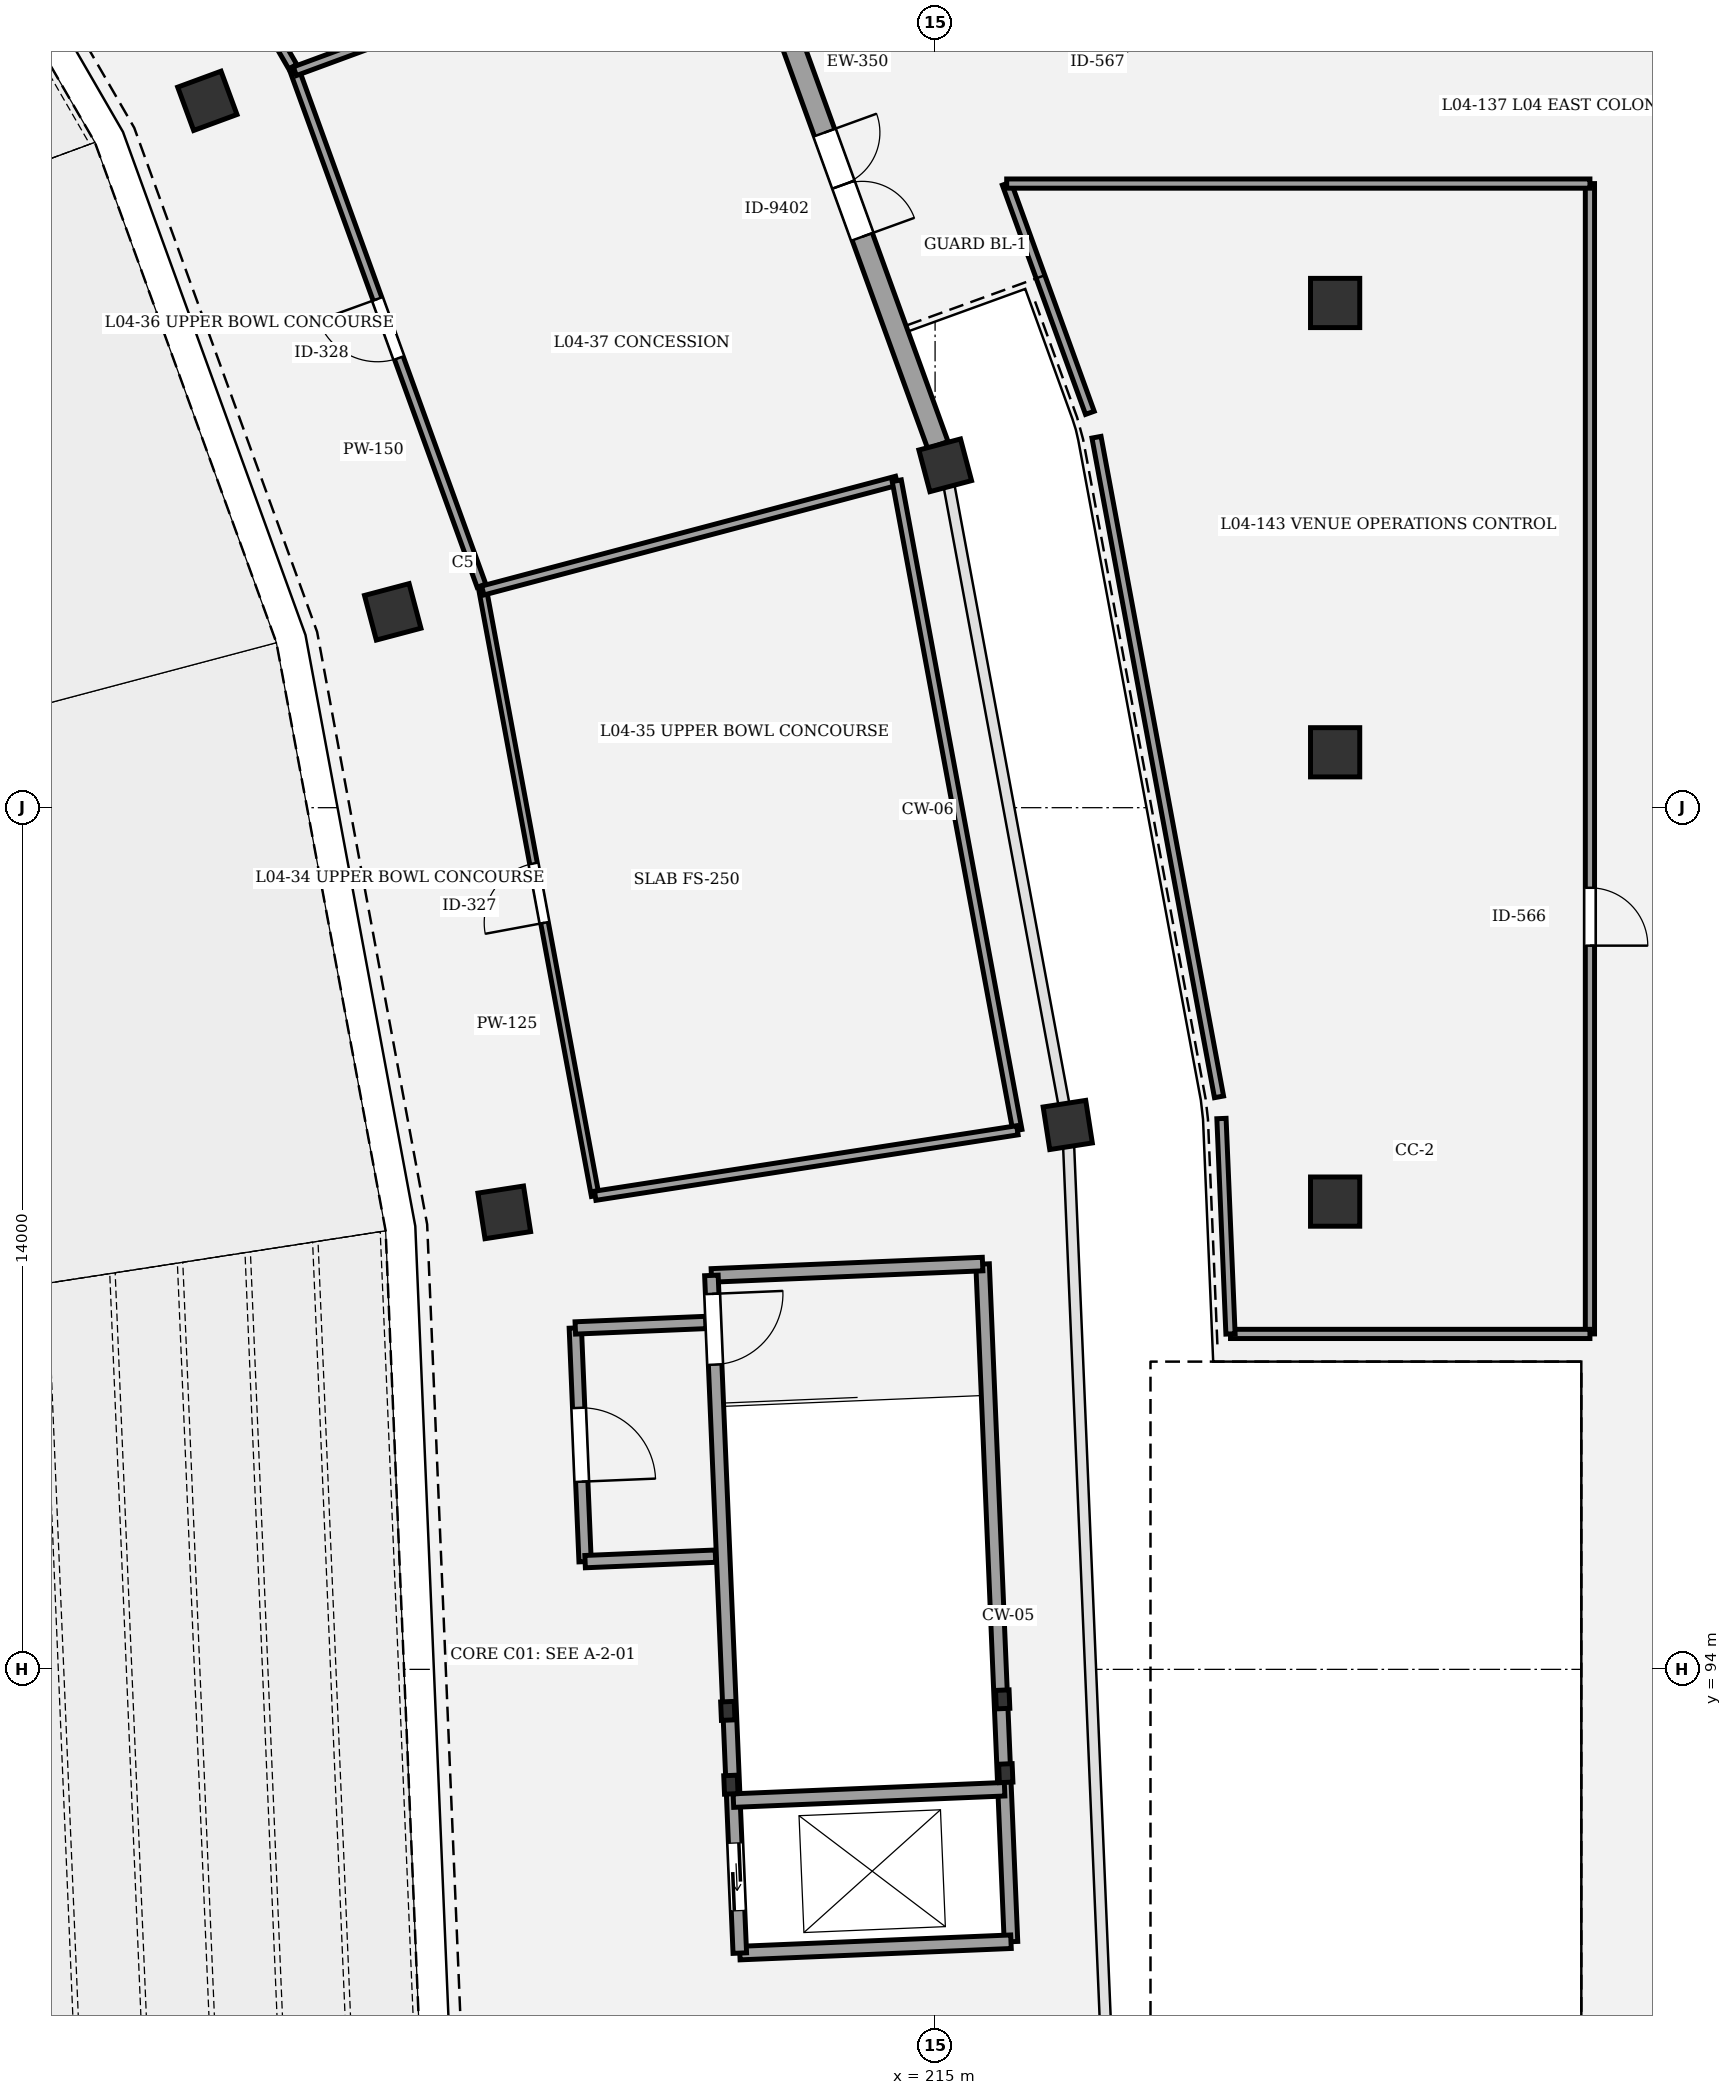
"""IFC4 building model, lengths in metres.
Left out: names, types, materials, properties, quantities, classifications, styles, units other than length and angle.
Written with IfcOpenShell. Run it as: python <this file> out.ifc"""

import sys

from ifc_helpers import new_model, si_unit, direction, frame, frame_2d, origin, origin_2d, place, context, subcontext, project, spatial, rectangle, circle, extrude, element, fill, save


model = new_model("IFC4")
c1 = context("Model", 3, precision=1e-05, world=origin(), true_north=direction((0.0, 1.0)))
c2 = subcontext(c1, "Body", "Model", "MODEL_VIEW")
j1 = project(units=[si_unit("LENGTHUNIT", "METRE"), si_unit("PLANEANGLEUNIT", "RADIAN")], contexts=[c1])
p1 = place(None, origin())
s1 = spatial("IfcSite", under=j1, at=p1, CompositionType="ELEMENT")
p2 = place(p1, origin())
s2 = spatial("IfcBuilding", under=s1, at=p2, CompositionType="ELEMENT")
p3 = place(p2, frame((0.0, 0.0, 19.2)))
s3 = spatial("IfcBuildingStorey", under=s2, at=p3, CompositionType="ELEMENT", Elevation=19.2)
p4 = place(p3, frame((208.0, 101.425, 0.0), z_axis=(0.0, 0.0, 1.0), x_axis=(0.98817491911, 0.153330783737, 0.0)))
e1 = element("IfcColumn", 1, at=p4, inside=s3, PredefinedType="COLUMN", context=c2, shape_type="SweptSolid", body=[
    extrude(rectangle(XDim=0.75, YDim=0.75, at=origin_2d()), origin(), (0.0, 0.0, 1.0), 4.8),
])
p5 = place(p3, frame((217.156, 102.845, 0.0), z_axis=(0.0, 0.0, 1.0), x_axis=(0.98817491911, 0.153330783737, 0.0)))
e2 = element("IfcColumn", 2, at=p5, inside=s3, PredefinedType="COLUMN", context=c2, shape_type="SweptSolid", body=[
    extrude(rectangle(XDim=0.7, YDim=0.7, at=origin_2d()), origin(), (0.0, 0.0, 1.0), 4.8),
])
p6 = place(p3, frame((206.188, 111.182, 0.0), z_axis=(0.0, 0.0, 1.0), x_axis=(0.966600102017, 0.256289373133, 0.0)))
e3 = element("IfcColumn", 3, at=p6, inside=s3, PredefinedType="COLUMN", context=c2, shape_type="SweptSolid", body=[
    extrude(rectangle(XDim=0.75, YDim=0.75, at=origin_2d()), origin(), (0.0, 0.0, 1.0), 4.8),
])
p7 = place(p3, frame((215.165, 113.562, 0.0), z_axis=(0.0, 0.0, 1.0), x_axis=(0.966600102017, 0.256289373133, 0.0)))
e4 = element("IfcColumn", 4, at=p7, inside=s3, PredefinedType="COLUMN", context=c2, shape_type="SweptSolid", body=[
    extrude(rectangle(XDim=0.7, YDim=0.7, at=origin_2d()), origin(), (0.0, 0.0, 1.0), 4.8),
])
p8 = place(p3, frame((203.176, 119.484, 0.0), z_axis=(0.0, 0.0, 1.0), x_axis=(0.938372433776, 0.34562577382, 0.0)))
e5 = element("IfcColumn", 5, at=p8, inside=s3, PredefinedType="COLUMN", context=c2, shape_type="SweptSolid", body=[
    extrude(rectangle(XDim=0.75, YDim=0.75, at=origin_2d()), origin(), (0.0, 0.0, 1.0), 4.8),
])
for number, where, z_axis, x_axis in (
    (6, (221.5, 101.6, 0.0), (0.0, 0.0, 1.0), (1.0, 0.0, 0.0)),
    (7, (221.5, 108.9, 0.0), (0.0, 0.0, 1.0), (1.0, 0.0, 0.0)),
    (8, (221.5, 116.2, 0.0), (0.0, 0.0, 1.0), (1.0, 0.0, 0.0)),
):
    element("IfcColumn", number, at=place(p3, frame(where, z_axis=z_axis, x_axis=x_axis)), inside=s3, PredefinedType="COLUMN", context=c2, shape_type="SweptSolid", body=[
        extrude(circle(Radius=0.4, at=origin_2d()), origin(), (0.0, 0.0, 1.0), 4.8),
    ])
p9 = place(p3, frame((211.975, 122.355, 0.0), z_axis=(0.0, 0.0, 1.0), x_axis=(0.341022457694, -0.9400551491, 0.0)))
e9 = element("IfcWall", 9, at=p9, inside=s3, PredefinedType="STANDARD", context=c2, shape_type="SweptSolid", body=[
    extrude(rectangle(XDim=9.005, YDim=0.35, at=frame_2d((4.503, 0.0))), origin(), (0.0, 0.0, 1.0), 3.57),
])
p10 = place(p9, frame((3.603, 0.0, 0.0)))
e10 = element("IfcOpeningElement", 10, at=p10, cuts=e9, PredefinedType="OPENING", context=c2, shape_type="SweptSolid", body=[
    extrude(rectangle(XDim=1.8, YDim=2.4, at=frame_2d((0.9, 1.2))), frame((0.0, 0.185, 0.0), z_axis=(0.0, -1.0, 0.0), x_axis=(1.0, 0.0, 0.0)), (0.0, 0.0, 1.0), 0.37),
])
for number, where, z_axis, x_axis in (
    (11, (211.632, 93.325, 0.0), (0.0, 0.0, 1.0), (0.042, -0.999, 0.0)),
    (12, (211.682, 92.126, 0.0), (0.0, 0.0, 1.0), (0.042, -0.999, 0.0)),
    (13, (216.148, 92.314, 0.0), (0.0, 0.0, 1.0), (0.042, -0.999, 0.0)),
    (14, (216.098, 93.513, 0.0), (0.0, 0.0, 1.0), (0.042, -0.999, 0.0)),
):
    element("IfcColumn", number, at=place(p3, frame(where, z_axis=z_axis, x_axis=x_axis)), inside=s3, PredefinedType="COLUMN", context=c2, shape_type="SweptSolid", body=[
        extrude(rectangle(XDim=0.3, YDim=0.22, at=origin_2d()), origin(), (0.0, 0.0, 1.0), 4.8),
    ])
p11 = place(p3, frame((215.772, 100.585, 0.0), z_axis=(0.0, 0.0, 1.0), x_axis=(0.041871977473, -0.999122984173, 0.0)))
e15 = element("IfcWall", 15, at=p11, inside=s3, PredefinedType="SHEAR", context=c2, shape_type="SweptSolid", body=[
    extrude(rectangle(XDim=11.02, YDim=0.22, at=frame_2d((5.51, 0.0))), origin(), (0.0, 0.0, 1.0), 4.55),
])
for number, where, z_axis, x_axis in (
    (16, (211.365, 100.4, 0.0), (0.0, 0.0, 1.0), (0.999, 0.042, 0.0)),
    (17, (211.827, 89.39, 0.0), (0.0, 0.0, 1.0), (0.999, 0.042, 0.0)),
):
    element("IfcWall", number, at=place(p3, frame(where, z_axis=z_axis, x_axis=x_axis)), inside=s3, PredefinedType="SHEAR", context=c2, shape_type="SweptSolid", body=[
        extrude(rectangle(XDim=4.41, YDim=0.22, at=frame_2d((2.205, 0.0))), origin(), (0.0, 0.0, 1.0), 4.55),
    ])
p12 = place(p3, frame((211.365, 100.4, 0.0), z_axis=(0.0, 0.0, 1.0), x_axis=(0.041871977473, -0.999122984173, 0.0)))
e18 = element("IfcWall", 18, at=p12, inside=s3, PredefinedType="SHEAR", context=c2, shape_type="SweptSolid", body=[
    extrude(rectangle(XDim=11.02, YDim=0.22, at=frame_2d((5.51, 0.0))), origin(), (0.0, 0.0, 1.0), 4.55),
])
p13 = place(p12, frame((0.3, 0.0, 0.0)))
e19 = element("IfcOpeningElement", 19, at=p13, cuts=e18, PredefinedType="OPENING", context=c2, shape_type="SweptSolid", body=[
    extrude(rectangle(XDim=1.15, YDim=2.15, at=frame_2d((0.575, 1.075))), frame((0.0, 0.12, 0.0), z_axis=(0.0, -1.0, 0.0), x_axis=(1.0, 0.0, 0.0)), (0.0, 0.0, 1.0), 0.24),
])
p14 = place(p12, frame((9.23, 0.0, 0.0)))
e20 = element("IfcOpeningElement", 20, at=p14, cuts=e18, PredefinedType="OPENING", context=c2, shape_type="SweptSolid", body=[
    extrude(rectangle(XDim=1.1, YDim=2.15, at=frame_2d((0.55, 1.075))), frame((0.0, 0.12, 0.0), z_axis=(0.0, -1.0, 0.0), x_axis=(1.0, 0.0, 0.0)), (0.0, 0.0, 1.0), 0.24),
])
p15 = place(p3, frame((211.723, 91.868, 0.0), z_axis=(0.0, 0.0, 1.0), x_axis=(0.999121521721, 0.041906859039, 0.0)))
e21 = element("IfcWall", 21, at=p15, inside=s3, PredefinedType="SHEAR", context=c2, shape_type="SweptSolid", body=[
    extrude(rectangle(XDim=4.41, YDim=0.22, at=frame_2d((2.205, 0.0))), origin(), (0.0, 0.0, 1.0), 4.55),
])
p16 = place(p3, frame((209.154, 99.547, 0.0), z_axis=(0.0, 0.0, 1.0), x_axis=(0.041889762691, -0.999122238658, 0.0)))
e22 = element("IfcWall", 22, at=p16, inside=s3, PredefinedType="PARTITIONING", context=c2, shape_type="SweptSolid", body=[
    extrude(rectangle(XDim=3.8, YDim=0.2, at=frame_2d((1.9, 0.0))), origin(), (0.0, 0.0, 1.0), 3.65),
])
p17 = place(p16, frame((1.3, 0.0, 0.0)))
e23 = element("IfcOpeningElement", 23, at=p17, cuts=e22, PredefinedType="OPENING", context=c2, shape_type="SweptSolid", body=[
    extrude(rectangle(XDim=1.2, YDim=2.18, at=frame_2d((0.6, 1.09))), frame((0.0, 0.11, 0.0), z_axis=(0.0, -1.0, 0.0), x_axis=(1.0, 0.0, 0.0)), (0.0, 0.0, 1.0), 0.22),
])
for number, where, z_axis, x_axis in (
    (24, (209.154, 99.547, 0.0), (0.0, 0.0, 1.0), (0.999, 0.042, 0.0)),
    (25, (209.313, 95.75, 0.0), (0.0, 0.0, 1.0), (0.999, 0.042, 0.0)),
):
    element("IfcWall", number, at=place(p3, frame(where, z_axis=z_axis, x_axis=x_axis)), inside=s3, PredefinedType="PARTITIONING", context=c2, shape_type="SweptSolid", body=[
        extrude(rectangle(XDim=2.12, YDim=0.2, at=frame_2d((1.06, 0.0))), origin(), (0.0, 0.0, 1.0), 3.65),
    ])
p18 = place(p3, frame((209.478, 101.695, 0.0), z_axis=(0.0, 0.0, 1.0), x_axis=(-0.18262590076, 0.983182475623, 0.0)))
e26 = element("IfcWall", 26, at=p18, inside=s3, PredefinedType="PARTITIONING", context=c2, shape_type="SweptSolid", body=[
    extrude(rectangle(XDim=10.002, YDim=0.125, at=frame_2d((5.001, 0.0))), origin(), (0.0, 0.0, 1.0), 3.55),
])
p19 = place(p18, frame((4.511, 0.0, 0.0)))
e27 = element("IfcOpeningElement", 27, at=p19, cuts=e26, PredefinedType="OPENING", context=c2, shape_type="SweptSolid", body=[
    extrude(rectangle(XDim=0.98, YDim=2.1, at=frame_2d((0.49, 1.05))), frame((0.0, 0.073, 0.0), z_axis=(0.0, -1.0, 0.0), x_axis=(1.0, 0.0, 0.0)), (0.0, 0.0, 1.0), 0.145),
])
p20 = place(p3, frame((207.63, 111.606, 0.0), z_axis=(0.0, 0.0, 1.0), x_axis=(-0.341024369151, 0.940054455681, 0.0)))
e28 = element("IfcWall", 28, at=p20, inside=s3, PredefinedType="PARTITIONING", context=c2, shape_type="SweptSolid", body=[
    extrude(rectangle(XDim=8.893, YDim=0.15, at=frame_2d((4.447, 0.0))), origin(), (0.0, 0.0, 1.0), 3.55),
])
p21 = place(p20, frame((3.936, 0.0, 0.0)))
e29 = element("IfcOpeningElement", 29, at=p21, cuts=e28, PredefinedType="OPENING", context=c2, shape_type="SweptSolid", body=[
    extrude(rectangle(XDim=1.02, YDim=2.1, at=frame_2d((0.51, 1.05))), frame((0.0, 0.085, 0.0), z_axis=(0.0, -1.0, 0.0), x_axis=(1.0, 0.0, 0.0)), (0.0, 0.0, 1.0), 0.17),
])
p22 = place(p3, frame((204.564, 120.039, 0.0), z_axis=(0.0, 0.0, 1.0), x_axis=(-0.500563217362, 0.865699985806, 0.0)))
e30 = element("IfcWall", 30, at=p22, inside=s3, PredefinedType="PARTITIONING", context=c2, shape_type="SweptSolid", body=[
    extrude(rectangle(XDim=8.444, YDim=0.15, at=frame_2d((4.222, 0.0))), origin(), (0.0, 0.0, 1.0), 3.55),
])
p23 = place(p22, frame((3.692, 0.0, 0.0)))
e31 = element("IfcOpeningElement", 31, at=p23, cuts=e30, PredefinedType="OPENING", context=c2, shape_type="SweptSolid", body=[
    extrude(rectangle(XDim=1.06, YDim=2.1, at=frame_2d((0.53, 1.05))), frame((0.0, 0.085, 0.0), z_axis=(0.0, -1.0, 0.0), x_axis=(1.0, 0.0, 0.0)), (0.0, 0.0, 1.0), 0.17),
])
p24 = place(p3, frame((225.64, 118.14, 0.0), z_axis=(0.0, 0.0, 1.0), x_axis=(0.0, -1.0, 0.0)))
e32 = element("IfcWall", 32, at=p24, inside=s3, PredefinedType="PARTITIONING", context=c2, shape_type="SweptSolid", body=[
    extrude(rectangle(XDim=18.69, YDim=0.15, at=frame_2d((9.345, 0.0))), origin(), (0.0, 0.0, 1.0), 3.55),
])
p25 = place(p24, frame((11.441, 0.0, 0.0)))
e33 = element("IfcOpeningElement", 33, at=p25, cuts=e32, PredefinedType="OPENING", context=c2, shape_type="SweptSolid", body=[
    extrude(rectangle(XDim=0.94, YDim=2.3, at=frame_2d((0.47, 1.15))), frame((0.0, 0.085, 0.0), z_axis=(0.0, -1.0, 0.0), x_axis=(1.0, 0.0, 0.0)), (0.0, 0.0, 1.0), 0.17),
])
p26 = place(p3, frame((207.651, 111.529, 0.0), z_axis=(0.0, 0.0, 1.0), x_axis=(0.966589237908, 0.256330343817, 0.0)))
e34 = element("IfcWall", 34, at=p26, inside=s3, PredefinedType="PARTITIONING", context=c2, shape_type="SweptSolid", body=[
    extrude(rectangle(XDim=6.958, YDim=0.15, at=frame_2d((3.479, 0.0))), origin(), (0.0, 0.0, 1.0), 3.55),
])
p27 = place(p3, frame((214.377, 113.312, 0.0), z_axis=(0.0, 0.0, 1.0), x_axis=(0.182612923346, -0.983184886086, 0.0)))
e35 = element("IfcWall", 35, at=p27, inside=s3, PredefinedType="PARTITIONING", context=c2, shape_type="SweptSolid", body=[
    extrude(rectangle(XDim=10.734, YDim=0.15, at=frame_2d((5.367, 0.0))), origin(), (0.0, 0.0, 1.0), 3.55),
])
p28 = place(p3, frame((216.337, 102.759, 0.0), z_axis=(0.0, 0.0, 1.0), x_axis=(-0.988183916405, -0.153272787404, 0.0)))
e36 = element("IfcWall", 36, at=p28, inside=s3, PredefinedType="PARTITIONING", context=c2, shape_type="SweptSolid", body=[
    extrude(rectangle(XDim=6.942, YDim=0.15, at=frame_2d((3.471, 0.0))), origin(), (0.0, 0.0, 1.0), 3.55),
])
p29 = place(p3, frame((204.597, 119.966, 0.0), z_axis=(0.0, 0.0, 1.0), x_axis=(0.938351535792, 0.345682506466, 0.0)))
e37 = element("IfcWall", 37, at=p29, inside=s3, PredefinedType="PARTITIONING", context=c2, shape_type="SweptSolid", body=[
    extrude(rectangle(XDim=6.931, YDim=0.15, at=frame_2d((3.466, 0.0))), origin(), (0.0, 0.0, 1.0), 3.55),
])
p30 = place(p3, frame((219.613, 103.302, 0.0), z_axis=(0.0, 0.0, 1.0), x_axis=(-0.182620957058, 0.983183393901, 0.0)))
e38 = element("IfcWall", 38, at=p30, inside=s3, PredefinedType="PARTITIONING", context=c2, shape_type="SweptSolid", body=[
    extrude(rectangle(XDim=10.901, YDim=0.15, at=frame_2d((5.45, 0.0))), origin(), (0.0, 0.0, 1.0), 3.55),
])
p31 = place(p3, frame((217.515, 114.415, 0.0), z_axis=(0.0, 0.0, 1.0), x_axis=(-0.341035525383, 0.94005040845, 0.0)))
e39 = element("IfcWall", 39, at=p31, inside=s3, PredefinedType="PARTITIONING", context=c2, shape_type="SweptSolid", body=[
    extrude(rectangle(XDim=3.962, YDim=0.15, at=frame_2d((1.981, 0.0))), origin(), (0.0, 0.0, 1.0), 3.55),
])
p32 = place(p3, frame((216.163, 118.14, 0.0), z_axis=(0.0, 0.0, 1.0), x_axis=(1.0, 0.0, 0.0)))
e40 = element("IfcWall", 40, at=p32, inside=s3, PredefinedType="PARTITIONING", context=c2, shape_type="SweptSolid", body=[
    extrude(rectangle(XDim=9.477, YDim=0.15, at=frame_2d((4.738, 0.0))), origin(), (0.0, 0.0, 1.0), 3.55),
])
p33 = place(p3, frame((225.64, 99.45, 0.0), z_axis=(0.0, 0.0, 1.0), x_axis=(-1.0, 0.0, 0.0)))
e41 = element("IfcWall", 41, at=p33, inside=s3, PredefinedType="PARTITIONING", context=c2, shape_type="SweptSolid", body=[
    extrude(rectangle(XDim=5.84, YDim=0.15, at=frame_2d((2.92, 0.0))), origin(), (0.0, 0.0, 1.0), 3.55),
])
p34 = place(p3, frame((219.8, 99.45, 0.0), z_axis=(0.0, 0.0, 1.0), x_axis=(-0.041888559174, 0.999122289117, 0.0)))
e42 = element("IfcWall", 42, at=p34, inside=s3, PredefinedType="PARTITIONING", context=c2, shape_type="SweptSolid", body=[
    extrude(rectangle(XDim=3.503, YDim=0.15, at=frame_2d((1.751, 0.0))), origin(), (0.0, 0.0, 1.0), 3.55),
])
p35 = place(p10, origin())
e43 = element("IfcDoor", 43, at=p35, inside=s3, OperationType="DOUBLE_DOOR_SINGLE_SWING", PredefinedType="DOOR", context=c2, shape_type="SweptSolid", body=[
    extrude(rectangle(XDim=1.8, YDim=2.4, at=frame_2d((0.9, 1.2))), frame((0.0, 0.025, 0.0), z_axis=(0.0, -1.0, 0.0), x_axis=(1.0, 0.0, 0.0)), (0.0, 0.0, 1.0), 0.05),
])
fill(e10, e43)
p36 = place(p13, origin())
e44 = element("IfcDoor", 44, at=p36, inside=s3, OperationType="SINGLE_SWING_LEFT", PredefinedType="DOOR", context=c2, shape_type="SweptSolid", body=[
    extrude(rectangle(XDim=1.15, YDim=2.15, at=frame_2d((0.575, 1.075))), frame((0.0, 0.025, 0.0), z_axis=(0.0, -1.0, 0.0), x_axis=(1.0, 0.0, 0.0)), (0.0, 0.0, 1.0), 0.05),
])
fill(e19, e44)
p37 = place(p14, origin())
e45 = element("IfcDoor", 45, at=p37, inside=s3, OperationType="DOUBLE_DOOR_SLIDING", PredefinedType="DOOR", context=c2, shape_type="SweptSolid", body=[
    extrude(rectangle(XDim=1.1, YDim=2.15, at=frame_2d((0.55, 1.075))), frame((0.0, 0.025, 0.0), z_axis=(0.0, -1.0, 0.0), x_axis=(1.0, 0.0, 0.0)), (0.0, 0.0, 1.0), 0.05),
])
fill(e20, e45)
p38 = place(p17, origin())
e46 = element("IfcDoor", 46, at=p38, inside=s3, OperationType="SINGLE_SWING_RIGHT", PredefinedType="DOOR", context=c2, shape_type="SweptSolid", body=[
    extrude(rectangle(XDim=1.2, YDim=2.18, at=frame_2d((0.6, 1.09))), frame((0.0, 0.025, 0.0), z_axis=(0.0, -1.0, 0.0), x_axis=(1.0, 0.0, 0.0)), (0.0, 0.0, 1.0), 0.05),
])
fill(e23, e46)
p39 = place(p19, origin())
e47 = element("IfcDoor", 47, at=p39, inside=s3, OperationType="SINGLE_SWING_LEFT", PredefinedType="DOOR", context=c2, shape_type="SweptSolid", body=[
    extrude(rectangle(XDim=0.98, YDim=2.1, at=frame_2d((0.49, 1.05))), frame((0.0, 0.025, 0.0), z_axis=(0.0, -1.0, 0.0), x_axis=(1.0, 0.0, 0.0)), (0.0, 0.0, 1.0), 0.05),
])
fill(e27, e47)
p40 = place(p21, origin())
e48 = element("IfcDoor", 48, at=p40, inside=s3, OperationType="SINGLE_SWING_RIGHT", PredefinedType="DOOR", context=c2, shape_type="SweptSolid", body=[
    extrude(rectangle(XDim=1.02, YDim=2.1, at=frame_2d((0.51, 1.05))), frame((0.0, 0.025, 0.0), z_axis=(0.0, -1.0, 0.0), x_axis=(1.0, 0.0, 0.0)), (0.0, 0.0, 1.0), 0.05),
])
fill(e29, e48)
p41 = place(p25, origin())
e49 = element("IfcDoor", 49, at=p41, inside=s3, OperationType="SINGLE_SWING_RIGHT", PredefinedType="DOOR", context=c2, shape_type="SweptSolid", body=[
    extrude(rectangle(XDim=0.94, YDim=2.3, at=frame_2d((0.47, 1.15))), frame((0.0, 0.025, 0.0), z_axis=(0.0, -1.0, 0.0), x_axis=(1.0, 0.0, 0.0)), (0.0, 0.0, 1.0), 0.05),
])
fill(e33, e49)
save(model, sys.argv[1])
